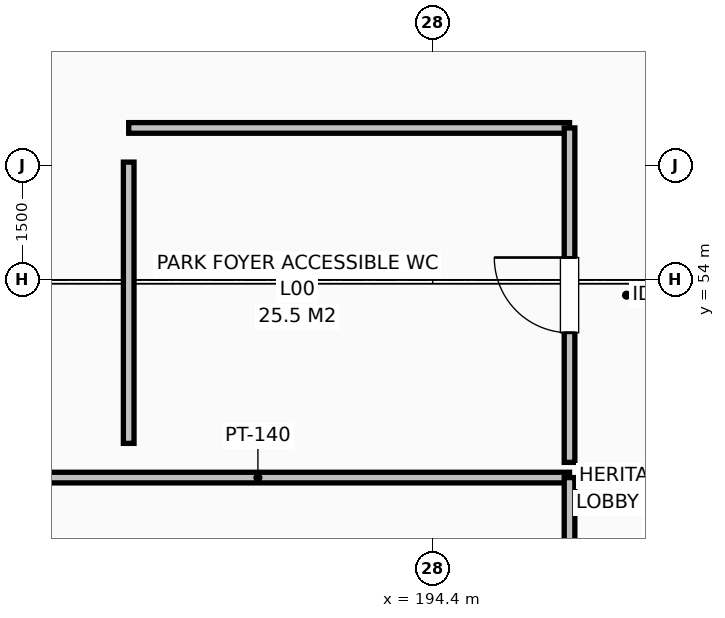
"""IFC4 building model, lengths in metres.
Left out: names, types, materials, properties, quantities, classifications, styles, units other than length and angle.
Written with IfcOpenShell. Run it as: python <this file> out.ifc"""

import sys

from ifc_helpers import new_model, si_unit, direction, frame, frame_2d, origin, place, context, subcontext, project, spatial, rectangle, extrude, element, fill, save


model = new_model("IFC4")
c1 = context("Model", 3, precision=1e-05, world=origin(), true_north=direction((0.0, 1.0)))
c2 = subcontext(c1, "Body", "Model", "MODEL_VIEW")
j1 = project(units=[si_unit("LENGTHUNIT", "METRE"), si_unit("PLANEANGLEUNIT", "RADIAN")], contexts=[c1])
p1 = place(None, origin())
s1 = spatial("IfcSite", under=j1, at=p1, CompositionType="ELEMENT")
p2 = place(p1, origin())
s2 = spatial("IfcBuilding", under=s1, at=p2, CompositionType="ELEMENT")
p3 = place(p2, origin())
s3 = spatial("IfcBuildingStorey", under=s2, at=p3, CompositionType="ELEMENT", Elevation=0.0)
p4 = place(p3, frame((188.0, 51.4, 0.0), z_axis=(0.0, 0.0, 1.0), x_axis=(1.0, 0.0, 0.0)))
e1 = element("IfcWall", 1, at=p4, inside=s3, PredefinedType="PARTITIONING", context=c2, shape_type="SweptSolid", body=[
    extrude(rectangle(XDim=8.2, YDim=0.14, at=frame_2d((4.1, 0.0))), origin(), (0.0, 0.0, 1.0), 3.8),
])
p5 = place(p3, frame((196.2, 45.2, 0.0), z_axis=(0.0, 0.0, 1.0), x_axis=(0.0, 1.0, 0.0)))
e2 = element("IfcWall", 2, at=p5, inside=s3, PredefinedType="PARTITIONING", context=c2, shape_type="SweptSolid", body=[
    extrude(rectangle(XDim=6.2, YDim=0.14, at=frame_2d((3.1, 0.0))), origin(), (0.0, 0.0, 1.0), 3.8),
])
p6 = place(p5, frame((2.61, 0.0, 0.0)))
e3 = element("IfcOpeningElement", 3, at=p6, cuts=e2, PredefinedType="OPENING", context=c2, shape_type="SweptSolid", body=[
    extrude(rectangle(XDim=0.98, YDim=2.15, at=frame_2d((0.49, 1.075))), frame((0.0, 0.08, 0.0), z_axis=(0.0, -1.0, 0.0), x_axis=(1.0, 0.0, 0.0)), (0.0, 0.0, 1.0), 0.16),
])
p7 = place(p3, frame((190.4, 56.0, 0.0), z_axis=(0.0, 0.0, 1.0), x_axis=(1.0, 0.0, 0.0)))
e4 = element("IfcWall", 4, at=p7, inside=s3, PredefinedType="PARTITIONING", context=c2, shape_type="SweptSolid", body=[
    extrude(rectangle(XDim=5.8, YDim=0.14, at=frame_2d((2.9, 0.0))), origin(), (0.0, 0.0, 1.0), 3.8),
])
p8 = place(p3, frame((190.4, 55.55, 0.0), z_axis=(0.0, 0.0, 1.0), x_axis=(0.0, -1.0, 0.0)))
e5 = element("IfcWall", 5, at=p8, inside=s3, PredefinedType="PARTITIONING", context=c2, shape_type="SweptSolid", body=[
    extrude(rectangle(XDim=3.7, YDim=0.14, at=frame_2d((1.85, 0.0))), origin(), (0.0, 0.0, 1.0), 3.8),
])
p9 = place(p3, frame((196.2, 51.6, 0.0), z_axis=(0.0, 0.0, 1.0), x_axis=(0.0, 1.0, 0.0)))
e6 = element("IfcWall", 6, at=p9, inside=s3, PredefinedType="PARTITIONING", context=c2, shape_type="SweptSolid", body=[
    extrude(rectangle(XDim=4.4, YDim=0.14, at=frame_2d((2.2, 0.0))), origin(), (0.0, 0.0, 1.0), 3.8),
])
p10 = place(p9, frame((1.705, 0.0, 0.0)))
e7 = element("IfcOpeningElement", 7, at=p10, cuts=e6, PredefinedType="OPENING", context=c2, shape_type="SweptSolid", body=[
    extrude(rectangle(XDim=0.99, YDim=2.15, at=frame_2d((0.495, 1.075))), frame((0.0, 0.08, 0.0), z_axis=(0.0, -1.0, 0.0), x_axis=(1.0, 0.0, 0.0)), (0.0, 0.0, 1.0), 0.16),
])
p11 = place(p10, origin())
e8 = element("IfcDoor", 8, at=p11, inside=s3, OperationType="SINGLE_SWING_RIGHT", PredefinedType="DOOR", context=c2, shape_type="SweptSolid", body=[
    extrude(rectangle(XDim=0.99, YDim=2.15, at=frame_2d((0.495, 1.075))), frame((0.0, 0.025, 0.0), z_axis=(0.0, -1.0, 0.0), x_axis=(1.0, 0.0, 0.0)), (0.0, 0.0, 1.0), 0.05),
])
fill(e7, e8)
save(model, sys.argv[1])
